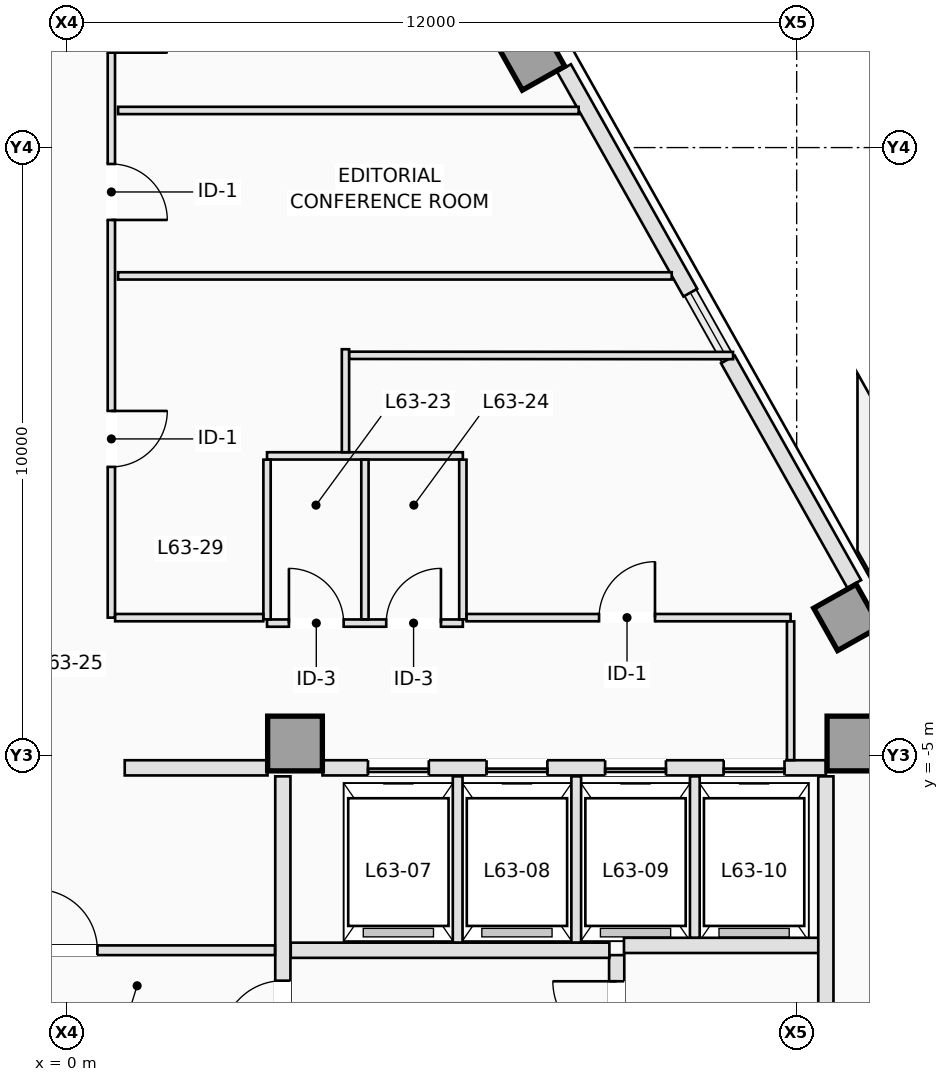
"""IFC4 building model, lengths in metres.
Left out: names, types, materials, properties, quantities, classifications, styles, units other than length and angle.
Written with IfcOpenShell. Run it as: python <this file> out.ifc"""

import sys

from ifc_helpers import new_model, si_unit, direction, frame, frame_2d, origin, origin_2d, place, context, subcontext, project, spatial, rectangle, extrude, element, fill, save


model = new_model("IFC4")
c1 = context("Model", 3, precision=1e-05, world=origin(), true_north=direction((0.0, 1.0)))
c2 = subcontext(c1, "Body", "Model", "MODEL_VIEW")
j1 = project(units=[si_unit("LENGTHUNIT", "METRE"), si_unit("PLANEANGLEUNIT", "RADIAN")], contexts=[c1])
p1 = place(None, origin())
s1 = spatial("IfcSite", under=j1, at=p1, CompositionType="ELEMENT")
p2 = place(p1, origin())
s2 = spatial("IfcBuilding", under=s1, at=p2, CompositionType="ELEMENT")
p3 = place(p2, frame((0.0, 0.0, 228.9)))
s3 = spatial("IfcBuildingStorey", under=s2, at=p3, CompositionType="ELEMENT", Elevation=228.9)
for number, where, z_axis, x_axis in (
    (1, (3.75, -4.8, 0.0), (0.0, 0.0, 1.0), (1.0, 0.0, 0.0)),
    (2, (12.95, -4.8, 0.0), (0.0, 0.0, 1.0), (1.0, 0.0, 0.0)),
):
    element("IfcColumn", number, at=place(p3, frame(where, z_axis=z_axis, x_axis=x_axis)), inside=s3, PredefinedType="COLUMN", context=c2, shape_type="SweptSolid", body=[
        extrude(rectangle(XDim=0.9, YDim=0.9, at=origin_2d()), origin(), (0.0, 0.0, 1.0), 3.5),
    ])
for number, where, z_axis, x_axis in (
    (3, (12.825, -2.727, 0.0), (0.0, 0.0, 1.0), (0.872, 0.49, 0.0)),
    (4, (7.642, 6.489, 0.0), (0.0, 0.0, 1.0), (0.872, 0.49, 0.0)),
):
    element("IfcColumn", number, at=place(p3, frame(where, z_axis=z_axis, x_axis=x_axis)), inside=s3, PredefinedType="COLUMN", context=c2, shape_type="SweptSolid", body=[
        extrude(rectangle(XDim=0.8, YDim=0.8, at=origin_2d()), origin(), (0.0, 0.0, 1.0), 3.5),
    ])
p4 = place(p3, frame((8.174, 6.307, 0.0), z_axis=(0.0, 0.0, 1.0), x_axis=(0.490269447258, -0.871570920284, 0.0)))
e5 = element("IfcWall", 5, at=p4, inside=s3, PredefinedType="STANDARD", context=c2, shape_type="SweptSolid", body=[
    extrude(rectangle(XDim=4.237, YDim=0.26, at=frame_2d((2.118, 0.0))), origin(), (0.0, 0.0, 1.0), 3.25),
])
p5 = place(p3, frame((10.869, 1.516, 0.0), z_axis=(0.0, 0.0, 1.0), x_axis=(0.490244825075, -0.871584770109, 0.0)))
e6 = element("IfcWall", 6, at=p5, inside=s3, PredefinedType="STANDARD", context=c2, shape_type="SweptSolid", body=[
    extrude(rectangle(XDim=4.237, YDim=0.26, at=frame_2d((2.119, 0.0))), origin(), (0.0, 0.0, 1.0), 3.25),
])
p6 = place(p3, frame((9.04, -10.18, 0.0), z_axis=(0.0, 0.0, 1.0), x_axis=(0.0, 1.0, 0.0)))
e7 = element("IfcWall", 7, at=p6, inside=s3, PredefinedType="PARTITIONING", context=c2, shape_type="SweptSolid", body=[
    extrude(rectangle(XDim=1.9, YDim=0.25, at=frame_2d((0.95, 0.0))), origin(), (0.0, 0.0, 1.0), 3.25),
])
p7 = place(p6, frame((0.42, 0.0, 0.0)))
e8 = element("IfcOpeningElement", 8, at=p7, cuts=e7, PredefinedType="OPENING", context=c2, shape_type="SweptSolid", body=[
    extrude(rectangle(XDim=1.05, YDim=2.15, at=frame_2d((0.525, 1.075))), frame((0.0, 0.135, 0.0), z_axis=(0.0, -1.0, 0.0), x_axis=(1.0, 0.0, 0.0)), (0.0, 0.0, 1.0), 0.27),
])
p8 = place(p3, frame((9.16, -8.12, 0.0), z_axis=(0.0, 0.0, 1.0), x_axis=(1.0, 0.0, 0.0)))
e9 = element("IfcWall", 9, at=p8, inside=s3, PredefinedType="PARTITIONING", context=c2, shape_type="SweptSolid", body=[
    extrude(rectangle(XDim=3.22, YDim=0.25, at=frame_2d((1.61, 0.0))), origin(), (0.0, 0.0, 1.0), 3.25),
])
p9 = place(p3, frame((12.48, -10.18, 0.0), z_axis=(0.0, 0.0, 1.0), x_axis=(0.0, 1.0, 0.0)))
e10 = element("IfcWall", 10, at=p9, inside=s3, PredefinedType="PARTITIONING", context=c2, shape_type="SweptSolid", body=[
    extrude(rectangle(XDim=4.84, YDim=0.25, at=frame_2d((2.42, 0.0))), origin(), (0.0, 0.0, 1.0), 3.25),
])
p10 = place(p3, frame((3.68, -8.2, 0.0), z_axis=(0.0, 0.0, 1.0), x_axis=(1.0, 0.0, 0.0)))
e11 = element("IfcWall", 11, at=p10, inside=s3, PredefinedType="PARTITIONING", context=c2, shape_type="SweptSolid", body=[
    extrude(rectangle(XDim=5.24, YDim=0.25, at=frame_2d((2.62, 0.0))), origin(), (0.0, 0.0, 1.0), 3.25),
])
p11 = place(p3, frame((3.55, -15.898, 0.0), z_axis=(0.0, 0.0, 1.0), x_axis=(0.0, 1.0, 0.0)))
e12 = element("IfcWall", 12, at=p11, inside=s3, PredefinedType="PARTITIONING", context=c2, shape_type="SweptSolid", body=[
    extrude(rectangle(XDim=10.558, YDim=0.25, at=frame_2d((5.279, 0.0))), origin(), (0.0, 0.0, 1.0), 3.25),
])
p12 = place(p11, frame((6.198, 0.0, 0.0)))
e13 = element("IfcOpeningElement", 13, at=p12, cuts=e12, PredefinedType="OPENING", context=c2, shape_type="SweptSolid", body=[
    extrude(rectangle(XDim=1.0, YDim=2.15, at=frame_2d((0.5, 1.075))), frame((0.0, 0.135, 0.0), z_axis=(0.0, -1.0, 0.0), x_axis=(1.0, 0.0, 0.0)), (0.0, 0.0, 1.0), 0.27),
])
p13 = place(p3, frame((4.202, -5.2, 0.0), z_axis=(0.0, 0.0, 1.0), x_axis=(1.0, 0.0, 0.0)))
e14 = element("IfcWall", 14, at=p13, inside=s3, PredefinedType="PARTITIONING", context=c2, shape_type="SweptSolid", body=[
    extrude(rectangle(XDim=8.278, YDim=0.25, at=frame_2d((4.139, 0.0))), origin(), (0.0, 0.0, 1.0), 3.25),
])
p14 = place(p13, frame((0.748, 0.0, 0.0)))
e15 = element("IfcOpeningElement", 15, at=p14, cuts=e14, PredefinedType="OPENING", context=c2, shape_type="SweptSolid", body=[
    extrude(rectangle(XDim=1.0, YDim=2.15, at=frame_2d((0.5, 1.075))), frame((0.0, 0.135, 0.0), z_axis=(0.0, -1.0, 0.0), x_axis=(1.0, 0.0, 0.0)), (0.0, 0.0, 1.0), 0.27),
])
p15 = place(p13, frame((2.698, 0.0, 0.0)))
e16 = element("IfcOpeningElement", 16, at=p15, cuts=e14, PredefinedType="OPENING", context=c2, shape_type="SweptSolid", body=[
    extrude(rectangle(XDim=1.0, YDim=2.15, at=frame_2d((0.5, 1.075))), frame((0.0, 0.135, 0.0), z_axis=(0.0, -1.0, 0.0), x_axis=(1.0, 0.0, 0.0)), (0.0, 0.0, 1.0), 0.27),
])
p16 = place(p13, frame((4.648, 0.0, 0.0)))
e17 = element("IfcOpeningElement", 17, at=p16, cuts=e14, PredefinedType="OPENING", context=c2, shape_type="SweptSolid", body=[
    extrude(rectangle(XDim=1.0, YDim=2.15, at=frame_2d((0.5, 1.075))), frame((0.0, 0.135, 0.0), z_axis=(0.0, -1.0, 0.0), x_axis=(1.0, 0.0, 0.0)), (0.0, 0.0, 1.0), 0.27),
])
p17 = place(p13, frame((6.598, 0.0, 0.0)))
e18 = element("IfcOpeningElement", 18, at=p17, cuts=e14, PredefinedType="OPENING", context=c2, shape_type="SweptSolid", body=[
    extrude(rectangle(XDim=1.0, YDim=2.15, at=frame_2d((0.5, 1.075))), frame((0.0, 0.135, 0.0), z_axis=(0.0, -1.0, 0.0), x_axis=(1.0, 0.0, 0.0)), (0.0, 0.0, 1.0), 0.27),
])
p18 = place(p3, frame((0.95, -5.2, 0.0), z_axis=(0.0, 0.0, 1.0), x_axis=(1.0, 0.0, 0.0)))
e19 = element("IfcWall", 19, at=p18, inside=s3, PredefinedType="PARTITIONING", context=c2, shape_type="SweptSolid", body=[
    extrude(rectangle(XDim=2.348, YDim=0.25, at=frame_2d((1.174, 0.0))), origin(), (0.0, 0.0, 1.0), 3.25),
])
for number, where, z_axis, x_axis in (
    (20, (6.425, -8.073, 0.0), (0.0, 0.0, 1.0), (0.0, 1.0, 0.0)),
    (21, (8.375, -8.073, 0.0), (0.0, 0.0, 1.0), (0.0, 1.0, 0.0)),
):
    element("IfcWall", number, at=place(p3, frame(where, z_axis=z_axis, x_axis=x_axis)), inside=s3, PredefinedType="PARTITIONING", context=c2, shape_type="SweptSolid", body=[
        extrude(rectangle(XDim=2.733, YDim=0.16, at=frame_2d((1.366, 0.0))), origin(), (0.0, 0.0, 1.0), 3.25),
    ])
p19 = place(p3, frame((10.325, -7.993, 0.0), z_axis=(0.0, 0.0, 1.0), x_axis=(0.0, 1.0, 0.0)))
e22 = element("IfcWall", 22, at=p19, inside=s3, PredefinedType="PARTITIONING", context=c2, shape_type="SweptSolid", body=[
    extrude(rectangle(XDim=2.653, YDim=0.16, at=frame_2d((1.326, 0.0))), origin(), (0.0, 0.0, 1.0), 3.25),
])
p20 = place(p3, frame((-3.42, -8.2, 0.0), z_axis=(0.0, 0.0, 1.0), x_axis=(1.0, 0.0, 0.0)))
e23 = element("IfcWall", 23, at=p20, inside=s3, PredefinedType="PARTITIONING", context=c2, shape_type="SweptSolid", body=[
    extrude(rectangle(XDim=6.84, YDim=0.16, at=frame_2d((3.42, 0.0))), origin(), (0.0, 0.0, 1.0), 3.25),
])
p21 = place(p20, frame((2.92, 0.0, 0.0)))
e24 = element("IfcOpeningElement", 24, at=p21, cuts=e23, PredefinedType="OPENING", context=c2, shape_type="SweptSolid", body=[
    extrude(rectangle(XDim=1.0, YDim=2.15, at=frame_2d((0.5, 1.075))), frame((0.0, 0.09, 0.0), z_axis=(0.0, -1.0, 0.0), x_axis=(1.0, 0.0, 0.0)), (0.0, 0.0, 1.0), 0.18),
])
p22 = place(p3, frame((3.29, -2.82, 0.0), z_axis=(0.0, 0.0, 1.0), x_axis=(1.0, 0.0, 0.0)))
e25 = element("IfcWall", 25, at=p22, inside=s3, PredefinedType="PARTITIONING", context=c2, shape_type="SweptSolid", body=[
    extrude(rectangle(XDim=3.22, YDim=0.12, at=frame_2d((1.61, 0.0))), origin(), (0.0, 0.0, 1.0), 2.943),
])
p23 = place(p22, frame((0.36, 0.0, 0.0)))
e26 = element("IfcOpeningElement", 26, at=p23, cuts=e25, PredefinedType="OPENING", context=c2, shape_type="SweptSolid", body=[
    extrude(rectangle(XDim=0.9, YDim=2.12, at=frame_2d((0.45, 1.06))), frame((0.0, 0.07, 0.0), z_axis=(0.0, -1.0, 0.0), x_axis=(1.0, 0.0, 0.0)), (0.0, 0.0, 1.0), 0.14),
])
p24 = place(p22, frame((1.96, 0.0, 0.0)))
e27 = element("IfcOpeningElement", 27, at=p24, cuts=e25, PredefinedType="OPENING", context=c2, shape_type="SweptSolid", body=[
    extrude(rectangle(XDim=0.9, YDim=2.12, at=frame_2d((0.45, 1.06))), frame((0.0, 0.07, 0.0), z_axis=(0.0, -1.0, 0.0), x_axis=(1.0, 0.0, 0.0)), (0.0, 0.0, 1.0), 0.14),
])
p25 = place(p3, frame((3.29, -0.07, 0.0), z_axis=(0.0, 0.0, 1.0), x_axis=(1.0, 0.0, 0.0)))
e28 = element("IfcWall", 28, at=p25, inside=s3, PredefinedType="PARTITIONING", context=c2, shape_type="SweptSolid", body=[
    extrude(rectangle(XDim=3.22, YDim=0.12, at=frame_2d((1.61, 0.0))), origin(), (0.0, 0.0, 1.0), 3.25),
])
p26 = place(p3, frame((3.29, -2.758, 0.0), z_axis=(0.0, 0.0, 1.0), x_axis=(0.0, 1.0, 0.0)))
e29 = element("IfcWall", 29, at=p26, inside=s3, PredefinedType="PARTITIONING", context=c2, shape_type="SweptSolid", body=[
    extrude(rectangle(XDim=2.626, YDim=0.12, at=frame_2d((1.313, 0.0))), origin(), (0.0, 0.0, 1.0), 2.79),
])
for number, where, z_axis, x_axis in (
    (30, (4.9, -2.758, 0.0), (0.0, 0.0, 1.0), (0.0, 1.0, 0.0)),
    (31, (6.51, -2.758, 0.0), (0.0, 0.0, 1.0), (0.0, 1.0, 0.0)),
):
    element("IfcWall", number, at=place(p3, frame(where, z_axis=z_axis, x_axis=x_axis)), inside=s3, PredefinedType="PARTITIONING", context=c2, shape_type="SweptSolid", body=[
        extrude(rectangle(XDim=2.626, YDim=0.12, at=frame_2d((1.313, 0.0))), origin(), (0.0, 0.0, 1.0), 3.25),
    ])
p27 = place(p3, frame((0.73, 8.588, 0.0), z_axis=(0.0, 0.0, 1.0), x_axis=(0.0, -1.0, 0.0)))
e32 = element("IfcWall", 32, at=p27, inside=s3, PredefinedType="PARTITIONING", context=c2, shape_type="SweptSolid", body=[
    extrude(rectangle(XDim=11.318, YDim=0.12, at=frame_2d((5.659, 0.0))), origin(), (0.0, 0.0, 1.0), 3.25),
])
p28 = place(p27, frame((1.107, 0.0, 0.0)))
e33 = element("IfcOpeningElement", 33, at=p28, cuts=e32, PredefinedType="OPENING", context=c2, shape_type="SweptSolid", body=[
    extrude(rectangle(XDim=0.92, YDim=2.12, at=frame_2d((0.46, 1.06))), frame((0.0, 0.07, 0.0), z_axis=(0.0, -1.0, 0.0), x_axis=(1.0, 0.0, 0.0)), (0.0, 0.0, 1.0), 0.14),
])
p29 = place(p27, frame((3.858, 0.0, 0.0)))
e34 = element("IfcOpeningElement", 34, at=p29, cuts=e32, PredefinedType="OPENING", context=c2, shape_type="SweptSolid", body=[
    extrude(rectangle(XDim=0.92, YDim=2.12, at=frame_2d((0.46, 1.06))), frame((0.0, 0.07, 0.0), z_axis=(0.0, -1.0, 0.0), x_axis=(1.0, 0.0, 0.0)), (0.0, 0.0, 1.0), 0.14),
])
p30 = place(p27, frame((7.919, 0.0, 0.0)))
e35 = element("IfcOpeningElement", 35, at=p30, cuts=e32, PredefinedType="OPENING", context=c2, shape_type="SweptSolid", body=[
    extrude(rectangle(XDim=0.92, YDim=2.12, at=frame_2d((0.46, 1.06))), frame((0.0, 0.07, 0.0), z_axis=(0.0, -1.0, 0.0), x_axis=(1.0, 0.0, 0.0)), (0.0, 0.0, 1.0), 0.14),
])
p31 = place(p3, frame((0.792, -2.73, 0.0), z_axis=(0.0, 0.0, 1.0), x_axis=(1.0, 0.0, 0.0)))
e36 = element("IfcWall", 36, at=p31, inside=s3, PredefinedType="PARTITIONING", context=c2, shape_type="SweptSolid", body=[
    extrude(rectangle(XDim=2.436, YDim=0.12, at=frame_2d((1.218, 0.0))), origin(), (0.0, 0.0, 1.0), 2.943),
])
p32 = place(p3, frame((6.572, -2.73, 0.0), z_axis=(0.0, 0.0, 1.0), x_axis=(1.0, 0.0, 0.0)))
e37 = element("IfcWall", 37, at=p32, inside=s3, PredefinedType="PARTITIONING", context=c2, shape_type="SweptSolid", body=[
    extrude(rectangle(XDim=5.328, YDim=0.12, at=frame_2d((2.664, 0.0))), origin(), (0.0, 0.0, 1.0), 3.25),
])
p33 = place(p32, frame((2.178, 0.0, 0.0)))
e38 = element("IfcOpeningElement", 38, at=p33, cuts=e37, PredefinedType="OPENING", context=c2, shape_type="SweptSolid", body=[
    extrude(rectangle(XDim=0.92, YDim=2.12, at=frame_2d((0.46, 1.06))), frame((0.0, 0.07, 0.0), z_axis=(0.0, -1.0, 0.0), x_axis=(1.0, 0.0, 0.0)), (0.0, 0.0, 1.0), 0.14),
])
p34 = place(p3, frame((11.9, -2.792, 0.0), z_axis=(0.0, 0.0, 1.0), x_axis=(0.0, -1.0, 0.0)))
e39 = element("IfcWall", 39, at=p34, inside=s3, PredefinedType="PARTITIONING", context=c2, shape_type="SweptSolid", body=[
    extrude(rectangle(XDim=2.281, YDim=0.12, at=frame_2d((1.141, 0.0))), origin(), (0.0, 0.0, 1.0), 3.25),
])
p35 = place(p3, frame((8.415, 5.61, 0.0), z_axis=(0.0, 0.0, 1.0), x_axis=(-1.0, 0.0, 0.0)))
e40 = element("IfcWall", 40, at=p35, inside=s3, PredefinedType="PARTITIONING", context=c2, shape_type="SweptSolid", body=[
    extrude(rectangle(XDim=7.575, YDim=0.12, at=frame_2d((3.787, 0.0))), origin(), (0.0, 0.0, 1.0), 3.25),
])
p36 = place(p3, frame((9.945, 2.89, 0.0), z_axis=(0.0, 0.0, 1.0), x_axis=(-1.0, 0.0, 0.0)))
e41 = element("IfcWall", 41, at=p36, inside=s3, PredefinedType="PARTITIONING", context=c2, shape_type="SweptSolid", body=[
    extrude(rectangle(XDim=9.105, YDim=0.12, at=frame_2d((4.552, 0.0))), origin(), (0.0, 0.0, 1.0), 2.943),
])
p37 = place(p3, frame((4.58, 1.684, 0.0), z_axis=(0.0, 0.0, 1.0), x_axis=(0.0, -1.0, 0.0)))
e42 = element("IfcWall", 42, at=p37, inside=s3, PredefinedType="PARTITIONING", context=c2, shape_type="SweptSolid", body=[
    extrude(rectangle(XDim=1.694, YDim=0.12, at=frame_2d((0.847, 0.0))), origin(), (0.0, 0.0, 1.0), 3.25),
])
p38 = place(p3, frame((10.954, 1.58, 0.0), z_axis=(0.0, 0.0, 1.0), x_axis=(-0.999999831682, 0.00058020336, 0.0)))
e43 = element("IfcWall", 43, at=p38, inside=s3, PredefinedType="PARTITIONING", context=c2, shape_type="SweptSolid", body=[
    extrude(rectangle(XDim=6.312, YDim=0.12, at=frame_2d((3.156, 0.0))), origin(), (0.0, 0.0, 1.0), 3.25),
])
p39 = place(p14, origin())
e44 = element("IfcDoor", 44, at=p39, inside=s3, OperationType="SLIDING_TO_RIGHT", PredefinedType="DOOR", context=c2, shape_type="SweptSolid", body=[
    extrude(rectangle(XDim=1.0, YDim=2.15, at=frame_2d((0.5, 1.075))), frame((0.0, 0.025, 0.0), z_axis=(0.0, -1.0, 0.0), x_axis=(1.0, 0.0, 0.0)), (0.0, 0.0, 1.0), 0.05),
])
fill(e15, e44)
p40 = place(p15, origin())
e45 = element("IfcDoor", 45, at=p40, inside=s3, OperationType="SLIDING_TO_RIGHT", PredefinedType="DOOR", context=c2, shape_type="SweptSolid", body=[
    extrude(rectangle(XDim=1.0, YDim=2.15, at=frame_2d((0.5, 1.075))), frame((0.0, 0.025, 0.0), z_axis=(0.0, -1.0, 0.0), x_axis=(1.0, 0.0, 0.0)), (0.0, 0.0, 1.0), 0.05),
])
fill(e16, e45)
p41 = place(p16, origin())
e46 = element("IfcDoor", 46, at=p41, inside=s3, OperationType="SLIDING_TO_RIGHT", PredefinedType="DOOR", context=c2, shape_type="SweptSolid", body=[
    extrude(rectangle(XDim=1.0, YDim=2.15, at=frame_2d((0.5, 1.075))), frame((0.0, 0.025, 0.0), z_axis=(0.0, -1.0, 0.0), x_axis=(1.0, 0.0, 0.0)), (0.0, 0.0, 1.0), 0.05),
])
fill(e17, e46)
p42 = place(p17, origin())
e47 = element("IfcDoor", 47, at=p42, inside=s3, OperationType="SLIDING_TO_RIGHT", PredefinedType="DOOR", context=c2, shape_type="SweptSolid", body=[
    extrude(rectangle(XDim=1.0, YDim=2.15, at=frame_2d((0.5, 1.075))), frame((0.0, 0.025, 0.0), z_axis=(0.0, -1.0, 0.0), x_axis=(1.0, 0.0, 0.0)), (0.0, 0.0, 1.0), 0.05),
])
fill(e18, e47)
p43 = place(p7, origin())
e48 = element("IfcDoor", 48, at=p43, inside=s3, OperationType="SINGLE_SWING_RIGHT", PredefinedType="DOOR", context=c2, shape_type="SweptSolid", body=[
    extrude(rectangle(XDim=1.05, YDim=2.15, at=frame_2d((0.525, 1.075))), frame((0.0, 0.025, 0.0), z_axis=(0.0, -1.0, 0.0), x_axis=(1.0, 0.0, 0.0)), (0.0, 0.0, 1.0), 0.05),
])
fill(e8, e48)
p44 = place(p12, origin())
e49 = element("IfcDoor", 49, at=p44, inside=s3, OperationType="SINGLE_SWING_LEFT", PredefinedType="DOOR", context=c2, shape_type="SweptSolid", body=[
    extrude(rectangle(XDim=1.0, YDim=2.15, at=frame_2d((0.5, 1.075))), frame((0.0, 0.025, 0.0), z_axis=(0.0, -1.0, 0.0), x_axis=(1.0, 0.0, 0.0)), (0.0, 0.0, 1.0), 0.05),
])
fill(e13, e49)
p45 = place(p21, origin())
e50 = element("IfcDoor", 50, at=p45, inside=s3, OperationType="SINGLE_SWING_LEFT", PredefinedType="DOOR", context=c2, shape_type="SweptSolid", body=[
    extrude(rectangle(XDim=1.0, YDim=2.15, at=frame_2d((0.5, 1.075))), frame((0.0, 0.025, 0.0), z_axis=(0.0, -1.0, 0.0), x_axis=(1.0, 0.0, 0.0)), (0.0, 0.0, 1.0), 0.05),
])
fill(e24, e50)
p46 = place(p23, origin())
e51 = element("IfcDoor", 51, at=p46, inside=s3, OperationType="SINGLE_SWING_LEFT", PredefinedType="DOOR", context=c2, shape_type="SweptSolid", body=[
    extrude(rectangle(XDim=0.9, YDim=2.12, at=frame_2d((0.45, 1.06))), frame((0.0, 0.025, 0.0), z_axis=(0.0, -1.0, 0.0), x_axis=(1.0, 0.0, 0.0)), (0.0, 0.0, 1.0), 0.05),
])
fill(e26, e51)
p47 = place(p24, origin())
e52 = element("IfcDoor", 52, at=p47, inside=s3, OperationType="SINGLE_SWING_RIGHT", PredefinedType="DOOR", context=c2, shape_type="SweptSolid", body=[
    extrude(rectangle(XDim=0.9, YDim=2.12, at=frame_2d((0.45, 1.06))), frame((0.0, 0.025, 0.0), z_axis=(0.0, -1.0, 0.0), x_axis=(1.0, 0.0, 0.0)), (0.0, 0.0, 1.0), 0.05),
])
fill(e27, e52)
p48 = place(p28, origin())
e53 = element("IfcDoor", 53, at=p48, inside=s3, OperationType="SINGLE_SWING_RIGHT", PredefinedType="DOOR", context=c2, shape_type="SweptSolid", body=[
    extrude(rectangle(XDim=0.92, YDim=2.12, at=frame_2d((0.46, 1.06))), frame((0.0, 0.025, 0.0), z_axis=(0.0, -1.0, 0.0), x_axis=(1.0, 0.0, 0.0)), (0.0, 0.0, 1.0), 0.05),
])
fill(e33, e53)
p49 = place(p29, origin())
e54 = element("IfcDoor", 54, at=p49, inside=s3, OperationType="SINGLE_SWING_RIGHT", PredefinedType="DOOR", context=c2, shape_type="SweptSolid", body=[
    extrude(rectangle(XDim=0.92, YDim=2.12, at=frame_2d((0.46, 1.06))), frame((0.0, 0.025, 0.0), z_axis=(0.0, -1.0, 0.0), x_axis=(1.0, 0.0, 0.0)), (0.0, 0.0, 1.0), 0.05),
])
fill(e34, e54)
p50 = place(p30, origin())
e55 = element("IfcDoor", 55, at=p50, inside=s3, OperationType="SINGLE_SWING_LEFT", PredefinedType="DOOR", context=c2, shape_type="SweptSolid", body=[
    extrude(rectangle(XDim=0.92, YDim=2.12, at=frame_2d((0.46, 1.06))), frame((0.0, 0.025, 0.0), z_axis=(0.0, -1.0, 0.0), x_axis=(1.0, 0.0, 0.0)), (0.0, 0.0, 1.0), 0.05),
])
fill(e35, e55)
p51 = place(p33, origin())
e56 = element("IfcDoor", 56, at=p51, inside=s3, OperationType="SINGLE_SWING_RIGHT", PredefinedType="DOOR", context=c2, shape_type="SweptSolid", body=[
    extrude(rectangle(XDim=0.92, YDim=2.12, at=frame_2d((0.46, 1.06))), frame((0.0, 0.025, 0.0), z_axis=(0.0, -1.0, 0.0), x_axis=(1.0, 0.0, 0.0)), (0.0, 0.0, 1.0), 0.05),
])
fill(e38, e56)
save(model, sys.argv[1])
